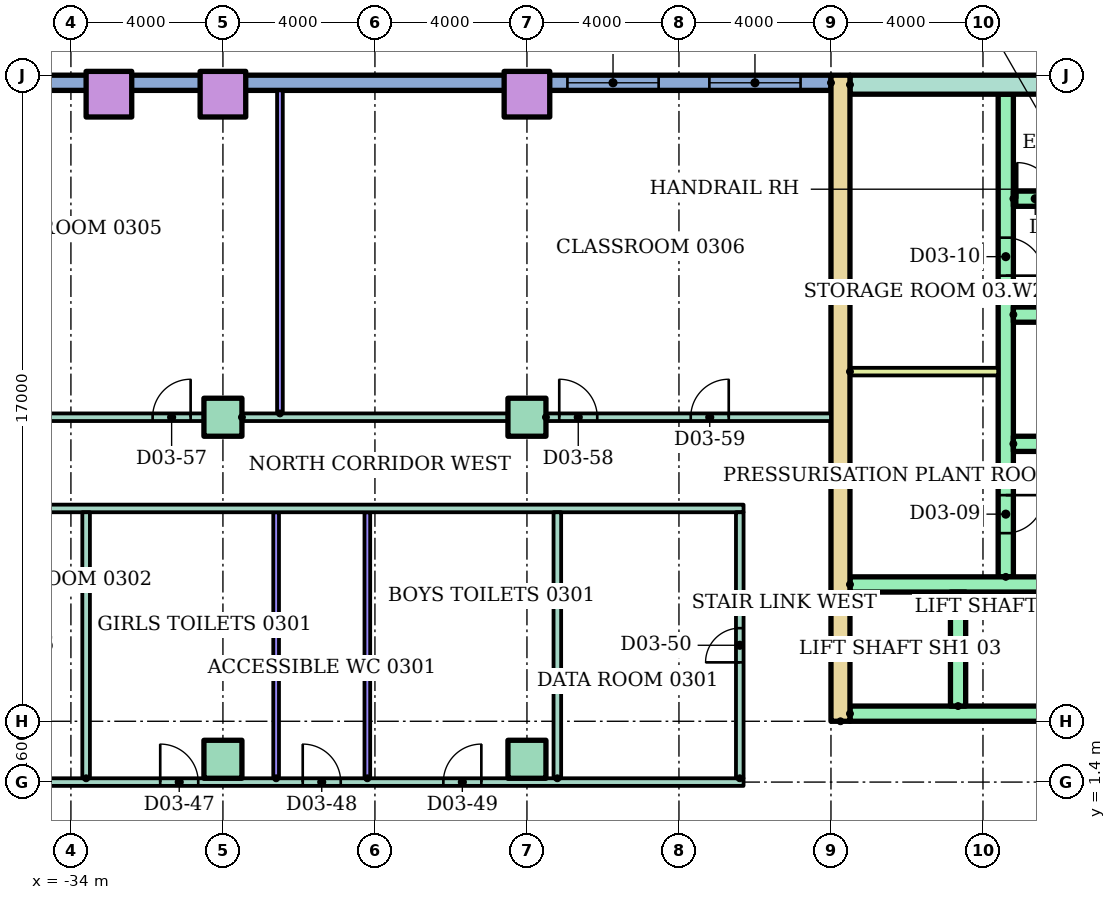
"""IFC4 building model, lengths in metres.
Left out: names, types, materials, properties, quantities, classifications, styles, units other than length and angle.
Written with IfcOpenShell. Run it as: python <this file> out.ifc"""

import sys

from ifc_helpers import new_model, si_unit, direction, frame, frame_2d, origin, origin_2d, place, context, subcontext, project, spatial, rectangle, hollow_rectangle, extrude, element, fill, save


model = new_model("IFC4")
c1 = context("Model", 3, precision=1e-05, world=origin(), true_north=direction((0.0, 1.0)))
c2 = subcontext(c1, "Body", "Model", "MODEL_VIEW")
j1 = project(units=[si_unit("LENGTHUNIT", "METRE"), si_unit("PLANEANGLEUNIT", "RADIAN")], contexts=[c1])
p1 = place(None, origin())
s1 = spatial("IfcSite", under=j1, at=p1, CompositionType="ELEMENT")
p2 = place(p1, origin())
s2 = spatial("IfcBuilding", under=s1, at=p2, CompositionType="ELEMENT")
p3 = place(p2, frame((0.0, 0.0, 14.0)))
s3 = spatial("IfcBuildingStorey", under=s2, at=p3, CompositionType="ELEMENT", Elevation=14.0)
for number, where in (
    (1, (-30.0, 2.0, 0.0)),
    (2, (-22.0, 2.0, 0.0)),
    (3, (-30.0, 11.0, 0.0)),
    (4, (-22.0, 11.0, 0.0)),
):
    element("IfcColumn", number, at=place(p3, frame(where)), inside=s3, PredefinedType="COLUMN", context=c2, shape_type="SweptSolid", body=[
        extrude(rectangle(XDim=1.0, YDim=1.0, at=origin_2d()), origin(), (0.0, 0.0, 1.0), 4.0),
    ])
for number, where in (
    (5, (-33.0, 19.5, 0.0)),
    (6, (-30.0, 19.5, 0.0)),
    (7, (-22.0, 19.5, 0.0)),
):
    element("IfcColumn", number, at=place(p3, frame(where)), inside=s3, PredefinedType="COLUMN", context=c2, shape_type="SweptSolid", body=[
        extrude(hollow_rectangle(XDim=1.2, YDim=1.2, WallThickness=0.06, at=origin_2d()), origin(), (0.0, 0.0, 1.0), 4.0),
    ])
p4 = place(p3, frame((-14.0, 19.8, 0.0), z_axis=(0.0, 0.0, 1.0), x_axis=(-1.0, 0.0, 0.0)))
e8 = element("IfcWall", 8, at=p4, inside=s3, PredefinedType="STANDARD", context=c2, shape_type="SweptSolid", body=[
    extrude(rectangle(XDim=25.6, YDim=0.4, at=frame_2d((12.8, 0.0))), origin(), (0.0, 0.0, 1.0), 3.7),
])
p5 = place(p4, frame((0.8, 0.0, 0.9)))
e9 = element("IfcOpeningElement", 9, at=p5, cuts=e8, PredefinedType="OPENING", context=c2, shape_type="SweptSolid", body=[
    extrude(rectangle(XDim=2.4, YDim=2.1, at=frame_2d((1.2, 1.05))), frame((0.0, 0.21, 0.0), z_axis=(0.0, -1.0, 0.0), x_axis=(1.0, 0.0, 0.0)), (0.0, 0.0, 1.0), 0.42),
])
p6 = place(p4, frame((4.535, 0.0, 0.9)))
e10 = element("IfcOpeningElement", 10, at=p6, cuts=e8, PredefinedType="OPENING", context=c2, shape_type="SweptSolid", body=[
    extrude(rectangle(XDim=2.4, YDim=2.1, at=frame_2d((1.2, 1.05))), frame((0.0, 0.21, 0.0), z_axis=(0.0, -1.0, 0.0), x_axis=(1.0, 0.0, 0.0)), (0.0, 0.0, 1.0), 0.42),
])
p7 = place(p4, frame((20.8, 0.0, 0.9)))
e11 = element("IfcOpeningElement", 11, at=p7, cuts=e8, PredefinedType="OPENING", context=c2, shape_type="SweptSolid", body=[
    extrude(rectangle(XDim=2.4, YDim=2.1, at=frame_2d((1.2, 1.05))), frame((0.0, 0.21, 0.0), z_axis=(0.0, -1.0, 0.0), x_axis=(1.0, 0.0, 0.0)), (0.0, 0.0, 1.0), 0.42),
])
p8 = place(p3, frame((-13.75, 3.0, 0.0), z_axis=(0.0, 0.0, 1.0), x_axis=(0.0, 1.0, 0.0)))
e12 = element("IfcWall", 12, at=p8, inside=s3, PredefinedType="SHEAR", context=c2, shape_type="SweptSolid", body=[
    extrude(rectangle(XDim=17.0, YDim=0.5, at=frame_2d((8.5, 0.0))), origin(), (0.0, 0.0, 1.0), 3.7),
])
p9 = place(p3, frame((-13.5, 19.75, 0.0)))
e13 = element("IfcWall", 13, at=p9, inside=s3, PredefinedType="SHEAR", context=c2, shape_type="SweptSolid", body=[
    extrude(rectangle(XDim=27.0, YDim=0.5, at=frame_2d((13.5, 0.0))), origin(), (0.0, 0.0, 1.0), 3.7),
])
p10 = place(p3, frame((-9.4, 6.8, 0.0), z_axis=(0.0, 0.0, 1.0), x_axis=(0.0, 1.0, 0.0)))
e14 = element("IfcWall", 14, at=p10, inside=s3, PredefinedType="SHEAR", context=c2, shape_type="SweptSolid", body=[
    extrude(rectangle(XDim=12.7, YDim=0.4, at=frame_2d((6.35, 0.0))), origin(), (0.0, 0.0, 1.0), 3.7),
])
p11 = place(p10, frame((1.15, 0.0, 0.0)))
e15 = element("IfcOpeningElement", 15, at=p11, cuts=e14, PredefinedType="OPENING", context=c2, shape_type="SweptSolid", body=[
    extrude(rectangle(XDim=1.0, YDim=2.1, at=frame_2d((0.5, 1.05))), frame((0.0, 0.21, 0.0), z_axis=(0.0, -1.0, 0.0), x_axis=(1.0, 0.0, 0.0)), (0.0, 0.0, 1.0), 0.42),
])
p12 = place(p10, frame((7.925, 0.0, 0.0)))
e16 = element("IfcOpeningElement", 16, at=p12, cuts=e14, PredefinedType="OPENING", context=c2, shape_type="SweptSolid", body=[
    extrude(rectangle(XDim=1.0, YDim=2.1, at=frame_2d((0.5, 1.05))), frame((0.0, 0.21, 0.0), z_axis=(0.0, -1.0, 0.0), x_axis=(1.0, 0.0, 0.0)), (0.0, 0.0, 1.0), 0.42),
])
p13 = place(p3, frame((-13.5, 3.2, 0.0)))
e17 = element("IfcWall", 17, at=p13, inside=s3, PredefinedType="SHEAR", context=c2, shape_type="SweptSolid", body=[
    extrude(rectangle(XDim=27.0, YDim=0.4, at=frame_2d((13.5, 0.0))), origin(), (0.0, 0.0, 1.0), 3.7),
])
p14 = place(p13, frame((6.861, 0.0, 0.0)))
e18 = element("IfcOpeningElement", 18, at=p14, cuts=e17, PredefinedType="OPENING", context=c2, shape_type="SweptSolid", body=[
    extrude(rectangle(XDim=1.1, YDim=2.1, at=frame_2d((0.55, 1.05))), frame((0.0, 0.21, 0.0), z_axis=(0.0, -1.0, 0.0), x_axis=(1.0, 0.0, 0.0)), (0.0, 0.0, 1.0), 0.42),
])
p15 = place(p13, frame((9.906, 0.0, 0.0)))
e19 = element("IfcOpeningElement", 19, at=p15, cuts=e17, PredefinedType="OPENING", context=c2, shape_type="SweptSolid", body=[
    extrude(rectangle(XDim=1.1, YDim=2.1, at=frame_2d((0.55, 1.05))), frame((0.0, 0.21, 0.0), z_axis=(0.0, -1.0, 0.0), x_axis=(1.0, 0.0, 0.0)), (0.0, 0.0, 1.0), 0.42),
])
p16 = place(p13, frame((15.994, 0.0, 0.0)))
e20 = element("IfcOpeningElement", 20, at=p16, cuts=e17, PredefinedType="OPENING", context=c2, shape_type="SweptSolid", body=[
    extrude(rectangle(XDim=1.1, YDim=2.1, at=frame_2d((0.55, 1.05))), frame((0.0, 0.21, 0.0), z_axis=(0.0, -1.0, 0.0), x_axis=(1.0, 0.0, 0.0)), (0.0, 0.0, 1.0), 0.42),
])
p17 = place(p13, frame((19.039, 0.0, 0.0)))
e21 = element("IfcOpeningElement", 21, at=p17, cuts=e17, PredefinedType="OPENING", context=c2, shape_type="SweptSolid", body=[
    extrude(rectangle(XDim=1.1, YDim=2.1, at=frame_2d((0.55, 1.05))), frame((0.0, 0.21, 0.0), z_axis=(0.0, -1.0, 0.0), x_axis=(1.0, 0.0, 0.0)), (0.0, 0.0, 1.0), 0.42),
])
p18 = place(p13, frame((12.6, 0.0, 0.0)))
e22 = element("IfcOpeningElement", 22, at=p18, cuts=e17, PredefinedType="OPENING", context=c2, shape_type="SweptSolid", body=[
    extrude(rectangle(XDim=1.8, YDim=2.1, at=frame_2d((0.9, 1.05))), frame((0.0, 0.21, 0.0), z_axis=(0.0, -1.0, 0.0), x_axis=(1.0, 0.0, 0.0)), (0.0, 0.0, 1.0), 0.42),
])
p19 = place(p3, frame((-13.5, 6.6, 0.0)))
e23 = element("IfcWall", 23, at=p19, inside=s3, PredefinedType="SHEAR", context=c2, shape_type="SweptSolid", body=[
    extrude(rectangle(XDim=11.978, YDim=0.4, at=frame_2d((5.989, 0.0))), origin(), (0.0, 0.0, 1.0), 3.7),
])
p20 = place(p3, frame((-10.656, 3.4, 0.0), z_axis=(0.0, 0.0, 1.0), x_axis=(0.0, 1.0, 0.0)))
e24 = element("IfcWall", 24, at=p20, inside=s3, PredefinedType="SHEAR", context=c2, shape_type="SweptSolid", body=[
    extrude(rectangle(XDim=3.0, YDim=0.4, at=frame_2d((1.5, 0.0))), origin(), (0.0, 0.0, 1.0), 3.7),
])
p21 = place(p3, frame((-9.2, 10.3, 0.0)))
e25 = element("IfcWall", 25, at=p21, inside=s3, PredefinedType="SHEAR", context=c2, shape_type="SweptSolid", body=[
    extrude(rectangle(XDim=8.0, YDim=0.4, at=frame_2d((4.0, 0.0))), origin(), (0.0, 0.0, 1.0), 3.7),
])
p22 = place(p21, frame((2.033, 0.0, 0.0)))
e26 = element("IfcOpeningElement", 26, at=p22, cuts=e25, PredefinedType="OPENING", context=c2, shape_type="SweptSolid", body=[
    extrude(rectangle(XDim=1.0, YDim=2.1, at=frame_2d((0.5, 1.05))), frame((0.0, 0.21, 0.0), z_axis=(0.0, -1.0, 0.0), x_axis=(1.0, 0.0, 0.0)), (0.0, 0.0, 1.0), 0.42),
])
p23 = place(p21, frame((6.133, 0.0, 0.0)))
e27 = element("IfcOpeningElement", 27, at=p23, cuts=e25, PredefinedType="OPENING", context=c2, shape_type="SweptSolid", body=[
    extrude(rectangle(XDim=1.0, YDim=2.1, at=frame_2d((0.5, 1.05))), frame((0.0, 0.21, 0.0), z_axis=(0.0, -1.0, 0.0), x_axis=(1.0, 0.0, 0.0)), (0.0, 0.0, 1.0), 0.42),
])
p24 = place(p3, frame((-9.2, 13.7, 0.0)))
e28 = element("IfcWall", 28, at=p24, inside=s3, PredefinedType="SHEAR", context=c2, shape_type="SweptSolid", body=[
    extrude(rectangle(XDim=8.0, YDim=0.4, at=frame_2d((4.0, 0.0))), origin(), (0.0, 0.0, 1.0), 3.7),
])
p25 = place(p3, frame((-9.2, 16.75, 0.0)))
e29 = element("IfcWall", 29, at=p25, inside=s3, PredefinedType="SHEAR", context=c2, shape_type="SweptSolid", body=[
    extrude(rectangle(XDim=18.4, YDim=0.4, at=frame_2d((9.2, 0.0))), origin(), (0.0, 0.0, 1.0), 3.7),
])
p26 = place(p25, frame((0.1, 0.0, 0.0)))
e30 = element("IfcOpeningElement", 30, at=p26, cuts=e29, PredefinedType="OPENING", context=c2, shape_type="SweptSolid", body=[
    extrude(rectangle(XDim=0.95, YDim=2.1, at=frame_2d((0.475, 1.05))), frame((0.0, 0.21, 0.0), z_axis=(0.0, -1.0, 0.0), x_axis=(1.0, 0.0, 0.0)), (0.0, 0.0, 1.0), 0.42),
])
p27 = place(p25, frame((6.1, 0.0, 0.0)))
e31 = element("IfcOpeningElement", 31, at=p27, cuts=e29, PredefinedType="OPENING", context=c2, shape_type="SweptSolid", body=[
    extrude(rectangle(XDim=0.95, YDim=2.1, at=frame_2d((0.475, 1.05))), frame((0.0, 0.21, 0.0), z_axis=(0.0, -1.0, 0.0), x_axis=(1.0, 0.0, 0.0)), (0.0, 0.0, 1.0), 0.42),
])
p28 = place(p25, frame((12.1, 0.0, 0.0)))
e32 = element("IfcOpeningElement", 32, at=p28, cuts=e29, PredefinedType="OPENING", context=c2, shape_type="SweptSolid", body=[
    extrude(rectangle(XDim=0.95, YDim=2.1, at=frame_2d((0.475, 1.05))), frame((0.0, 0.21, 0.0), z_axis=(0.0, -1.0, 0.0), x_axis=(1.0, 0.0, 0.0)), (0.0, 0.0, 1.0), 0.42),
])
p29 = place(p3, frame((-13.5, 12.2, 0.0)))
e33 = element("IfcWall", 33, at=p29, inside=s3, PredefinedType="PARTITIONING", context=c2, shape_type="SweptSolid", body=[
    extrude(rectangle(XDim=3.9, YDim=0.2, at=frame_2d((1.95, 0.0))), origin(), (0.0, 0.0, 1.0), 3.7),
])
p30 = place(p3, frame((-36.9, 1.4, 0.0)))
e34 = element("IfcWall", 34, at=p30, inside=s3, PredefinedType="PARTITIONING", context=c2, shape_type="SweptSolid", body=[
    extrude(rectangle(XDim=20.6, YDim=0.2, at=frame_2d((10.3, 0.0))), origin(), (0.0, 0.0, 1.0), 3.7),
])
p31 = place(p30, frame((5.25, 0.0, 0.0)))
e35 = element("IfcOpeningElement", 35, at=p31, cuts=e34, PredefinedType="OPENING", context=c2, shape_type="SweptSolid", body=[
    extrude(rectangle(XDim=1.0, YDim=2.1, at=frame_2d((0.5, 1.05))), frame((0.0, 0.11, 0.0), z_axis=(0.0, -1.0, 0.0), x_axis=(1.0, 0.0, 0.0)), (0.0, 0.0, 1.0), 0.22),
])
p32 = place(p30, frame((9.0, 0.0, 0.0)))
e36 = element("IfcOpeningElement", 36, at=p32, cuts=e34, PredefinedType="OPENING", context=c2, shape_type="SweptSolid", body=[
    extrude(rectangle(XDim=1.0, YDim=2.1, at=frame_2d((0.5, 1.05))), frame((0.0, 0.11, 0.0), z_axis=(0.0, -1.0, 0.0), x_axis=(1.0, 0.0, 0.0)), (0.0, 0.0, 1.0), 0.22),
])
p33 = place(p30, frame((12.7, 0.0, 0.0)))
e37 = element("IfcOpeningElement", 37, at=p33, cuts=e34, PredefinedType="OPENING", context=c2, shape_type="SweptSolid", body=[
    extrude(rectangle(XDim=1.0, YDim=2.1, at=frame_2d((0.5, 1.05))), frame((0.0, 0.11, 0.0), z_axis=(0.0, -1.0, 0.0), x_axis=(1.0, 0.0, 0.0)), (0.0, 0.0, 1.0), 0.22),
])
p34 = place(p3, frame((-37.6, 8.6, 0.0)))
e38 = element("IfcWall", 38, at=p34, inside=s3, PredefinedType="PARTITIONING", context=c2, shape_type="SweptSolid", body=[
    extrude(rectangle(XDim=21.3, YDim=0.2, at=frame_2d((10.65, 0.0))), origin(), (0.0, 0.0, 1.0), 3.7),
])
p35 = place(p3, frame((-36.9, 11.0, 0.0)))
e39 = element("IfcWall", 39, at=p35, inside=s3, PredefinedType="PARTITIONING", context=c2, shape_type="SweptSolid", body=[
    extrude(rectangle(XDim=6.4, YDim=0.2, at=frame_2d((3.2, 0.0))), origin(), (0.0, 0.0, 1.0), 3.7),
])
p36 = place(p35, frame((0.802, 0.0, 0.0)))
e40 = element("IfcOpeningElement", 40, at=p36, cuts=e39, PredefinedType="OPENING", context=c2, shape_type="SweptSolid", body=[
    extrude(rectangle(XDim=1.0, YDim=2.1, at=frame_2d((0.5, 1.05))), frame((0.0, 0.11, 0.0), z_axis=(0.0, -1.0, 0.0), x_axis=(1.0, 0.0, 0.0)), (0.0, 0.0, 1.0), 0.22),
])
p37 = place(p35, frame((5.05, 0.0, 0.0)))
e41 = element("IfcOpeningElement", 41, at=p37, cuts=e39, PredefinedType="OPENING", context=c2, shape_type="SweptSolid", body=[
    extrude(rectangle(XDim=1.0, YDim=2.1, at=frame_2d((0.5, 1.05))), frame((0.0, 0.11, 0.0), z_axis=(0.0, -1.0, 0.0), x_axis=(1.0, 0.0, 0.0)), (0.0, 0.0, 1.0), 0.22),
])
p38 = place(p3, frame((-29.5, 11.0, 0.0)))
e42 = element("IfcWall", 42, at=p38, inside=s3, PredefinedType="PARTITIONING", context=c2, shape_type="SweptSolid", body=[
    extrude(rectangle(XDim=7.0, YDim=0.2, at=frame_2d((3.5, 0.0))), origin(), (0.0, 0.0, 1.0), 3.7),
])
p39 = place(p3, frame((-21.5, 11.0, 0.0)))
e43 = element("IfcWall", 43, at=p39, inside=s3, PredefinedType="PARTITIONING", context=c2, shape_type="SweptSolid", body=[
    extrude(rectangle(XDim=7.5, YDim=0.2, at=frame_2d((3.75, 0.0))), origin(), (0.0, 0.0, 1.0), 3.7),
])
p40 = place(p39, frame((0.35, 0.0, 0.0)))
e44 = element("IfcOpeningElement", 44, at=p40, cuts=e43, PredefinedType="OPENING", context=c2, shape_type="SweptSolid", body=[
    extrude(rectangle(XDim=1.0, YDim=2.1, at=frame_2d((0.5, 1.05))), frame((0.0, 0.11, 0.0), z_axis=(0.0, -1.0, 0.0), x_axis=(1.0, 0.0, 0.0)), (0.0, 0.0, 1.0), 0.22),
])
p41 = place(p39, frame((3.81, 0.0, 0.0)))
e45 = element("IfcOpeningElement", 45, at=p41, cuts=e43, PredefinedType="OPENING", context=c2, shape_type="SweptSolid", body=[
    extrude(rectangle(XDim=1.0, YDim=2.1, at=frame_2d((0.5, 1.05))), frame((0.0, 0.11, 0.0), z_axis=(0.0, -1.0, 0.0), x_axis=(1.0, 0.0, 0.0)), (0.0, 0.0, 1.0), 0.22),
])
p42 = place(p3, frame((-33.6, 1.5, 0.0), z_axis=(0.0, 0.0, 1.0), x_axis=(0.0, 1.0, 0.0)))
e46 = element("IfcWall", 46, at=p42, inside=s3, PredefinedType="PARTITIONING", context=c2, shape_type="SweptSolid", body=[
    extrude(rectangle(XDim=7.0, YDim=0.2, at=frame_2d((3.5, 0.0))), origin(), (0.0, 0.0, 1.0), 3.7),
])
p43 = place(p3, frame((-28.6, 1.5, 0.0), z_axis=(0.0, 0.0, 1.0), x_axis=(0.0, 1.0, 0.0)))
e47 = element("IfcWall", 47, at=p43, inside=s3, PredefinedType="PARTITIONING", context=c2, shape_type="SweptSolid", body=[
    extrude(rectangle(XDim=7.0, YDim=0.15, at=frame_2d((3.5, 0.0))), origin(), (0.0, 0.0, 1.0), 3.7),
])
p44 = place(p3, frame((-28.5, 11.1, 0.0), z_axis=(0.0, 0.0, 1.0), x_axis=(0.0, 1.0, 0.0)))
e48 = element("IfcWall", 48, at=p44, inside=s3, PredefinedType="PARTITIONING", context=c2, shape_type="SweptSolid", body=[
    extrude(rectangle(XDim=8.5, YDim=0.15, at=frame_2d((4.25, 0.0))), origin(), (0.0, 0.0, 1.0), 3.7),
])
p45 = place(p3, frame((-26.2, 1.5, 0.0), z_axis=(0.0, 0.0, 1.0), x_axis=(0.0, 1.0, 0.0)))
e49 = element("IfcWall", 49, at=p45, inside=s3, PredefinedType="PARTITIONING", context=c2, shape_type="SweptSolid", body=[
    extrude(rectangle(XDim=7.0, YDim=0.15, at=frame_2d((3.5, 0.0))), origin(), (0.0, 0.0, 1.0), 3.7),
])
p46 = place(p3, frame((-21.2, 1.5, 0.0), z_axis=(0.0, 0.0, 1.0), x_axis=(0.0, 1.0, 0.0)))
e50 = element("IfcWall", 50, at=p46, inside=s3, PredefinedType="PARTITIONING", context=c2, shape_type="SweptSolid", body=[
    extrude(rectangle(XDim=7.0, YDim=0.2, at=frame_2d((3.5, 0.0))), origin(), (0.0, 0.0, 1.0), 3.7),
])
p47 = place(p3, frame((-16.4, 1.5, 0.0), z_axis=(0.0, 0.0, 1.0), x_axis=(0.0, 1.0, 0.0)))
e51 = element("IfcWall", 51, at=p47, inside=s3, PredefinedType="PARTITIONING", context=c2, shape_type="SweptSolid", body=[
    extrude(rectangle(XDim=7.0, YDim=0.2, at=frame_2d((3.5, 0.0))), origin(), (0.0, 0.0, 1.0), 3.7),
])
p48 = place(p47, frame((3.05, 0.0, 0.0)))
e52 = element("IfcOpeningElement", 52, at=p48, cuts=e51, PredefinedType="OPENING", context=c2, shape_type="SweptSolid", body=[
    extrude(rectangle(XDim=0.9, YDim=2.1, at=frame_2d((0.45, 1.05))), frame((0.0, 0.11, 0.0), z_axis=(0.0, -1.0, 0.0), x_axis=(1.0, 0.0, 0.0)), (0.0, 0.0, 1.0), 0.22),
])
p49 = place(p5, origin())
e53 = element("IfcWindow", 53, at=p49, inside=s3, PartitioningType="SINGLE_PANEL", PredefinedType="WINDOW", context=c2, shape_type="SweptSolid", body=[
    extrude(rectangle(XDim=2.4, YDim=2.1, at=frame_2d((1.2, 1.05))), frame((0.0, 0.03, 0.0), z_axis=(0.0, -1.0, 0.0), x_axis=(1.0, 0.0, 0.0)), (0.0, 0.0, 1.0), 0.06),
])
fill(e9, e53)
p50 = place(p6, origin())
e54 = element("IfcWindow", 54, at=p50, inside=s3, PartitioningType="SINGLE_PANEL", PredefinedType="WINDOW", context=c2, shape_type="SweptSolid", body=[
    extrude(rectangle(XDim=2.4, YDim=2.1, at=frame_2d((1.2, 1.05))), frame((0.0, 0.03, 0.0), z_axis=(0.0, -1.0, 0.0), x_axis=(1.0, 0.0, 0.0)), (0.0, 0.0, 1.0), 0.06),
])
fill(e10, e54)
p51 = place(p26, origin())
e55 = element("IfcDoor", 55, at=p51, inside=s3, OperationType="SINGLE_SWING_LEFT", PredefinedType="DOOR", context=c2, shape_type="SweptSolid", body=[
    extrude(rectangle(XDim=0.95, YDim=2.1, at=frame_2d((0.475, 1.05))), frame((0.0, 0.025, 0.0), z_axis=(0.0, -1.0, 0.0), x_axis=(1.0, 0.0, 0.0)), (0.0, 0.0, 1.0), 0.05),
])
fill(e30, e55)
p52 = place(p11, frame((1.0, 0.0, 0.0), z_axis=(0.0, 0.0, 1.0), x_axis=(-1.0, 0.0, 0.0)))
e56 = element("IfcDoor", 56, at=p52, inside=s3, OperationType="SINGLE_SWING_RIGHT", PredefinedType="DOOR", context=c2, shape_type="SweptSolid", body=[
    extrude(rectangle(XDim=1.0, YDim=2.1, at=frame_2d((0.5, 1.05))), frame((0.0, 0.025, 0.0), z_axis=(0.0, -1.0, 0.0), x_axis=(1.0, 0.0, 0.0)), (0.0, 0.0, 1.0), 0.05),
])
fill(e15, e56)
p53 = place(p12, frame((1.0, 0.0, 0.0), z_axis=(0.0, 0.0, 1.0), x_axis=(-1.0, 0.0, 0.0)))
e57 = element("IfcDoor", 57, at=p53, inside=s3, OperationType="SINGLE_SWING_LEFT", PredefinedType="DOOR", context=c2, shape_type="SweptSolid", body=[
    extrude(rectangle(XDim=1.0, YDim=2.1, at=frame_2d((0.5, 1.05))), frame((0.0, 0.025, 0.0), z_axis=(0.0, -1.0, 0.0), x_axis=(1.0, 0.0, 0.0)), (0.0, 0.0, 1.0), 0.05),
])
fill(e16, e57)
p54 = place(p31, origin())
e58 = element("IfcDoor", 58, at=p54, inside=s3, OperationType="SINGLE_SWING_LEFT", PredefinedType="DOOR", context=c2, shape_type="SweptSolid", body=[
    extrude(rectangle(XDim=1.0, YDim=2.1, at=frame_2d((0.5, 1.05))), frame((0.0, 0.025, 0.0), z_axis=(0.0, -1.0, 0.0), x_axis=(1.0, 0.0, 0.0)), (0.0, 0.0, 1.0), 0.05),
])
fill(e35, e58)
p55 = place(p32, origin())
e59 = element("IfcDoor", 59, at=p55, inside=s3, OperationType="SINGLE_SWING_LEFT", PredefinedType="DOOR", context=c2, shape_type="SweptSolid", body=[
    extrude(rectangle(XDim=1.0, YDim=2.1, at=frame_2d((0.5, 1.05))), frame((0.0, 0.025, 0.0), z_axis=(0.0, -1.0, 0.0), x_axis=(1.0, 0.0, 0.0)), (0.0, 0.0, 1.0), 0.05),
])
fill(e36, e59)
p56 = place(p33, origin())
e60 = element("IfcDoor", 60, at=p56, inside=s3, OperationType="SINGLE_SWING_RIGHT", PredefinedType="DOOR", context=c2, shape_type="SweptSolid", body=[
    extrude(rectangle(XDim=1.0, YDim=2.1, at=frame_2d((0.5, 1.05))), frame((0.0, 0.025, 0.0), z_axis=(0.0, -1.0, 0.0), x_axis=(1.0, 0.0, 0.0)), (0.0, 0.0, 1.0), 0.05),
])
fill(e37, e60)
p57 = place(p48, origin())
e61 = element("IfcDoor", 61, at=p57, inside=s3, OperationType="SINGLE_SWING_LEFT", PredefinedType="DOOR", context=c2, shape_type="SweptSolid", body=[
    extrude(rectangle(XDim=0.9, YDim=2.1, at=frame_2d((0.45, 1.05))), frame((0.0, 0.025, 0.0), z_axis=(0.0, -1.0, 0.0), x_axis=(1.0, 0.0, 0.0)), (0.0, 0.0, 1.0), 0.05),
])
fill(e52, e61)
p58 = place(p37, origin())
e62 = element("IfcDoor", 62, at=p58, inside=s3, OperationType="SINGLE_SWING_RIGHT", PredefinedType="DOOR", context=c2, shape_type="SweptSolid", body=[
    extrude(rectangle(XDim=1.0, YDim=2.1, at=frame_2d((0.5, 1.05))), frame((0.0, 0.025, 0.0), z_axis=(0.0, -1.0, 0.0), x_axis=(1.0, 0.0, 0.0)), (0.0, 0.0, 1.0), 0.05),
])
fill(e41, e62)
p59 = place(p40, origin())
e63 = element("IfcDoor", 63, at=p59, inside=s3, OperationType="SINGLE_SWING_LEFT", PredefinedType="DOOR", context=c2, shape_type="SweptSolid", body=[
    extrude(rectangle(XDim=1.0, YDim=2.1, at=frame_2d((0.5, 1.05))), frame((0.0, 0.025, 0.0), z_axis=(0.0, -1.0, 0.0), x_axis=(1.0, 0.0, 0.0)), (0.0, 0.0, 1.0), 0.05),
])
fill(e44, e63)
p60 = place(p41, origin())
e64 = element("IfcDoor", 64, at=p60, inside=s3, OperationType="SINGLE_SWING_RIGHT", PredefinedType="DOOR", context=c2, shape_type="SweptSolid", body=[
    extrude(rectangle(XDim=1.0, YDim=2.1, at=frame_2d((0.5, 1.05))), frame((0.0, 0.025, 0.0), z_axis=(0.0, -1.0, 0.0), x_axis=(1.0, 0.0, 0.0)), (0.0, 0.0, 1.0), 0.05),
])
fill(e45, e64)
save(model, sys.argv[1])
